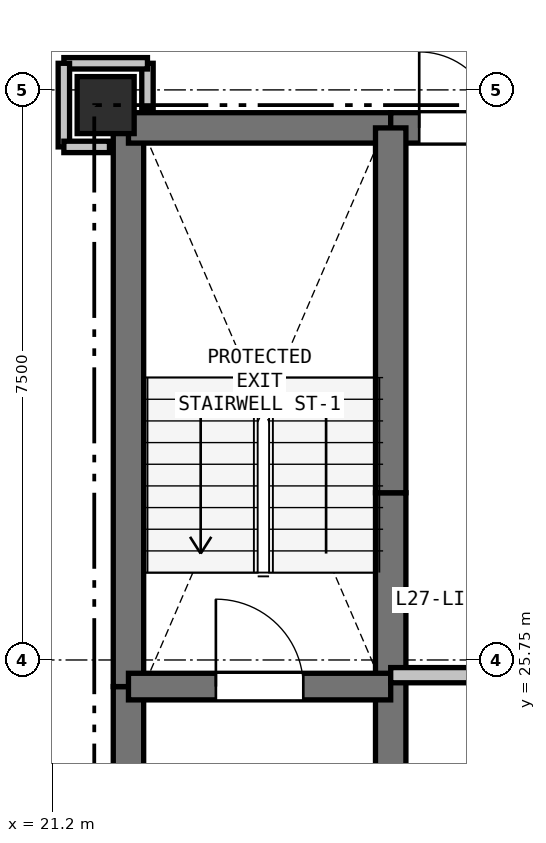
"""IFC4 building model, lengths in metres.
Left out: names, types, materials, properties, quantities, classifications, styles, units other than length and angle.
Written with IfcOpenShell. Run it as: python <this file> out.ifc"""

import sys

from ifc_helpers import new_model, si_unit, direction, frame, frame_2d, origin, origin_2d, place, context, subcontext, project, spatial, rectangle, extrude, element, fill, save


model = new_model("IFC4")
c1 = context("Model", 3, precision=1e-05, world=origin(), true_north=direction((0.0, 1.0)))
c2 = subcontext(c1, "Body", "Model", "MODEL_VIEW")
j1 = project(units=[si_unit("LENGTHUNIT", "METRE"), si_unit("PLANEANGLEUNIT", "RADIAN")], contexts=[c1])
p1 = place(None, origin())
s1 = spatial("IfcSite", under=j1, at=p1, CompositionType="ELEMENT")
p2 = place(p1, origin())
s2 = spatial("IfcBuilding", under=s1, at=p2, CompositionType="ELEMENT")
p3 = place(p2, frame((0.0, 0.0, 99.9)))
s3 = spatial("IfcBuildingStorey", under=s2, at=p3, CompositionType="ELEMENT", Elevation=99.9)
p4 = place(p3, frame((21.9, 33.05, 0.0), z_axis=(0.0, 0.0, 1.0), x_axis=(1.0, 0.0, 0.0)))
e1 = element("IfcColumn", 1, at=p4, inside=s3, PredefinedType="COLUMN", context=c2, shape_type="SweptSolid", body=[
    extrude(rectangle(XDim=0.75, YDim=0.75, at=origin_2d()), origin(), (0.0, 0.0, 1.0), 3.3),
])
p5 = place(p3, frame((22.2, 20.75, 0.0), z_axis=(0.0, 0.0, 1.0), x_axis=(0.0, 1.0, 0.0)))
e2 = element("IfcWall", 2, at=p5, inside=s3, PredefinedType="SHEAR", context=c2, shape_type="SweptSolid", body=[
    extrude(rectangle(XDim=4.65, YDim=0.4, at=frame_2d((2.325, 0.0))), origin(), (0.0, 0.0, 1.0), 3.05),
])
p6 = place(p3, frame((22.2, 25.4, 0.0), z_axis=(0.0, 0.0, 1.0), x_axis=(0.0, 1.0, 0.0)))
e3 = element("IfcWall", 3, at=p6, inside=s3, PredefinedType="SHEAR", context=c2, shape_type="SweptSolid", body=[
    extrude(rectangle(XDim=7.35, YDim=0.4, at=frame_2d((3.675, 0.0))), origin(), (0.0, 0.0, 1.0), 3.05),
])
p7 = place(p3, frame((22.2, 32.75, 0.0), z_axis=(0.0, 0.0, 1.0), x_axis=(1.0, 0.0, 0.0)))
e4 = element("IfcWall", 4, at=p7, inside=s3, PredefinedType="SHEAR", context=c2, shape_type="SweptSolid", body=[
    extrude(rectangle(XDim=3.45, YDim=0.4, at=frame_2d((1.725, 0.0))), origin(), (0.0, 0.0, 1.0), 3.05),
])
p8 = place(p3, frame((25.65, 32.75, 0.0), z_axis=(0.0, 0.0, 1.0), x_axis=(1.0, 0.0, 0.0)))
e5 = element("IfcWall", 5, at=p8, inside=s3, PredefinedType="SHEAR", context=c2, shape_type="SweptSolid", body=[
    extrude(rectangle(XDim=1.75, YDim=0.4, at=frame_2d((0.875, 0.0))), origin(), (0.0, 0.0, 1.0), 3.05),
])
p9 = place(p8, frame((0.375, 0.0, 0.0)))
e6 = element("IfcOpeningElement", 6, at=p9, cuts=e5, PredefinedType="OPENING", context=c2, shape_type="SweptSolid", body=[
    extrude(rectangle(XDim=1.0, YDim=2.15, at=frame_2d((0.5, 1.075))), frame((0.0, 0.21, 0.0), z_axis=(0.0, -1.0, 0.0), x_axis=(1.0, 0.0, 0.0)), (0.0, 0.0, 1.0), 0.42),
])
p10 = place(p3, frame((25.65, 22.75, 0.0), z_axis=(0.0, 0.0, 1.0), x_axis=(0.0, 1.0, 0.0)))
e7 = element("IfcWall", 7, at=p10, inside=s3, PredefinedType="SHEAR", context=c2, shape_type="SweptSolid", body=[
    extrude(rectangle(XDim=2.8, YDim=0.4, at=frame_2d((1.4, 0.0))), origin(), (0.0, 0.0, 1.0), 3.05),
])
p11 = place(p3, frame((25.65, 25.55, 0.0), z_axis=(0.0, 0.0, 1.0), x_axis=(0.0, 1.0, 0.0)))
e8 = element("IfcWall", 8, at=p11, inside=s3, PredefinedType="SHEAR", context=c2, shape_type="SweptSolid", body=[
    extrude(rectangle(XDim=2.4, YDim=0.4, at=frame_2d((1.2, 0.0))), origin(), (0.0, 0.0, 1.0), 3.05),
])
p12 = place(p3, frame((25.65, 27.95, 0.0), z_axis=(0.0, 0.0, 1.0), x_axis=(0.0, 1.0, 0.0)))
e9 = element("IfcWall", 9, at=p12, inside=s3, PredefinedType="SHEAR", context=c2, shape_type="SweptSolid", body=[
    extrude(rectangle(XDim=4.8, YDim=0.4, at=frame_2d((2.4, 0.0))), origin(), (0.0, 0.0, 1.0), 3.05),
])
p13 = place(p3, frame((22.2, 25.4, 0.0), z_axis=(0.0, 0.0, 1.0), x_axis=(1.0, 0.0, 0.0)))
e10 = element("IfcWall", 10, at=p13, inside=s3, PredefinedType="SHEAR", context=c2, shape_type="SweptSolid", body=[
    extrude(rectangle(XDim=3.45, YDim=0.35, at=frame_2d((1.725, 0.0))), origin(), (0.0, 0.0, 1.0), 3.05),
])
p14 = place(p13, frame((1.15, 0.0, 0.0)))
e11 = element("IfcOpeningElement", 11, at=p14, cuts=e10, PredefinedType="OPENING", context=c2, shape_type="SweptSolid", body=[
    extrude(rectangle(XDim=1.15, YDim=2.15, at=frame_2d((0.575, 1.075))), frame((0.0, 0.185, 0.0), z_axis=(0.0, -1.0, 0.0), x_axis=(1.0, 0.0, 0.0)), (0.0, 0.0, 1.0), 0.37),
])
p15 = place(p3, frame((25.65, 25.55, 0.0), z_axis=(0.0, 0.0, 1.0), x_axis=(1.0, 0.0, 0.0)))
e12 = element("IfcWall", 12, at=p15, inside=s3, PredefinedType="PARTITIONING", context=c2, shape_type="SweptSolid", body=[
    extrude(rectangle(XDim=4.95, YDim=0.2, at=frame_2d((2.475, 0.0))), origin(), (0.0, 0.0, 1.0), 3.05),
])
p16 = place(p3, frame((22.45, 33.0, 0.0), z_axis=(0.0, 0.0, 1.0), x_axis=(0.0, 1.0, 0.0)))
e13 = element("IfcWall", 13, at=p16, inside=s3, PredefinedType="PARTITIONING", context=c2, shape_type="SweptSolid", body=[
    extrude(rectangle(XDim=0.6, YDim=0.15, at=frame_2d((0.3, 0.0))), origin(), (0.0, 0.0, 1.0), 2.498),
])
p17 = place(p3, frame((22.45, 33.6, 0.0), z_axis=(0.0, 0.0, 1.0), x_axis=(-1.0, 0.0, 0.0)))
e14 = element("IfcWall", 14, at=p17, inside=s3, PredefinedType="PARTITIONING", context=c2, shape_type="SweptSolid", body=[
    extrude(rectangle(XDim=1.1, YDim=0.15, at=frame_2d((0.55, 0.0))), origin(), (0.0, 0.0, 1.0), 3.05),
])
p18 = place(p3, frame((21.35, 33.6, 0.0), z_axis=(0.0, 0.0, 1.0), x_axis=(0.0, -1.0, 0.0)))
e15 = element("IfcWall", 15, at=p18, inside=s3, PredefinedType="PARTITIONING", context=c2, shape_type="SweptSolid", body=[
    extrude(rectangle(XDim=1.1, YDim=0.15, at=frame_2d((0.55, 0.0))), origin(), (0.0, 0.0, 1.0), 2.423),
])
p19 = place(p3, frame((21.35, 32.5, 0.0), z_axis=(0.0, 0.0, 1.0), x_axis=(1.0, 0.0, 0.0)))
e16 = element("IfcWall", 16, at=p19, inside=s3, PredefinedType="PARTITIONING", context=c2, shape_type="SweptSolid", body=[
    extrude(rectangle(XDim=0.6, YDim=0.15, at=frame_2d((0.3, 0.0))), origin(), (0.0, 0.0, 1.0), 2.498),
])
p20 = place(p9, origin())
e17 = element("IfcDoor", 17, at=p20, inside=s3, OperationType="SINGLE_SWING_LEFT", PredefinedType="DOOR", context=c2, shape_type="SweptSolid", body=[
    extrude(rectangle(XDim=1.0, YDim=2.15, at=frame_2d((0.5, 1.075))), frame((0.0, 0.025, 0.0), z_axis=(0.0, -1.0, 0.0), x_axis=(1.0, 0.0, 0.0)), (0.0, 0.0, 1.0), 0.05),
])
fill(e6, e17)
p21 = place(p14, origin())
e18 = element("IfcDoor", 18, at=p21, inside=s3, OperationType="SINGLE_SWING_LEFT", PredefinedType="DOOR", context=c2, shape_type="SweptSolid", body=[
    extrude(rectangle(XDim=1.15, YDim=2.15, at=frame_2d((0.575, 1.075))), frame((0.0, 0.025, 0.0), z_axis=(0.0, -1.0, 0.0), x_axis=(1.0, 0.0, 0.0)), (0.0, 0.0, 1.0), 0.05),
])
fill(e11, e18)
save(model, sys.argv[1])
